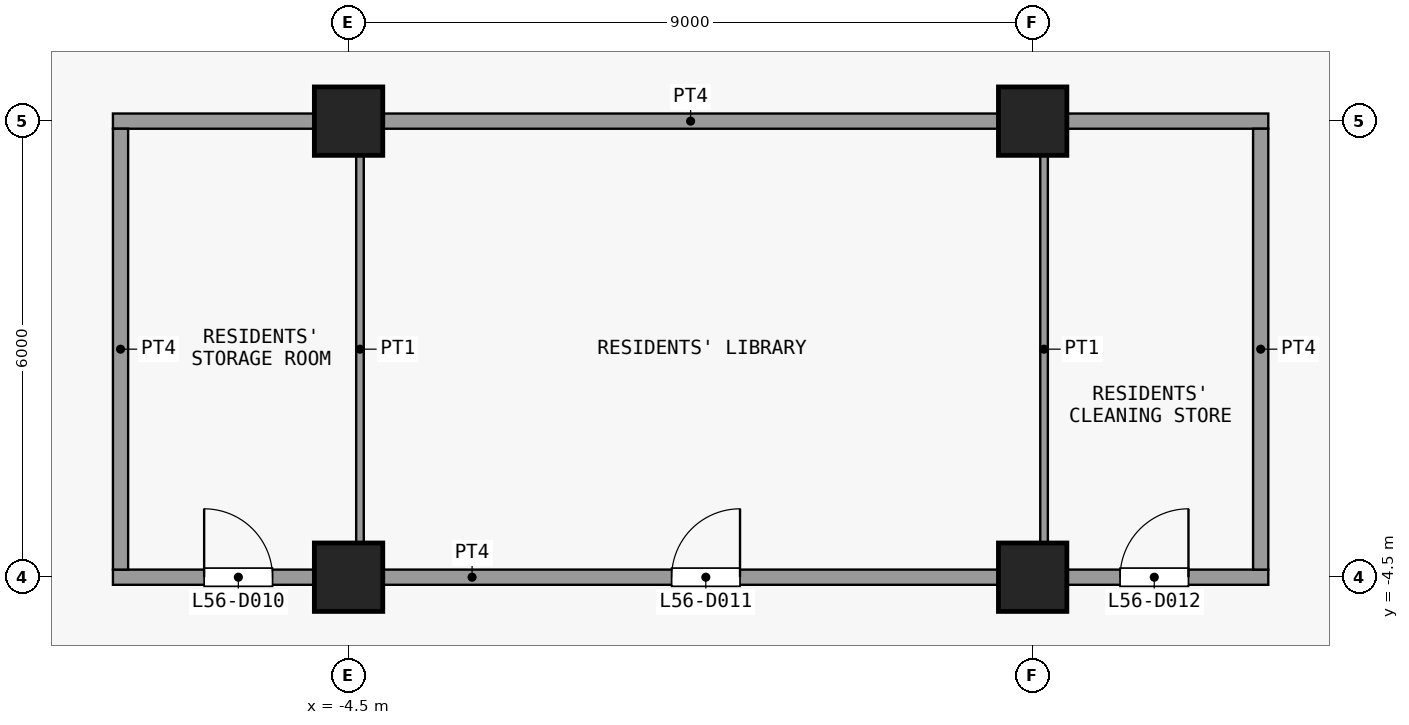
"""IFC4 building model, lengths in metres.
Left out: names, types, materials, properties, quantities, classifications, styles, units other than length and angle.
Written with IfcOpenShell. Run it as: python <this file> out.ifc"""

import sys

from ifc_helpers import new_model, si_unit, direction, frame, frame_2d, origin, origin_2d, place, context, subcontext, project, spatial, rectangle, extrude, element, fill, save


model = new_model("IFC4")
c1 = context("Model", 3, precision=1e-05, world=origin(), true_north=direction((0.0, 1.0)))
c2 = subcontext(c1, "Body", "Model", "MODEL_VIEW")
j1 = project(units=[si_unit("LENGTHUNIT", "METRE"), si_unit("PLANEANGLEUNIT", "RADIAN")], contexts=[c1])
p1 = place(None, origin())
s1 = spatial("IfcSite", under=j1, at=p1, CompositionType="ELEMENT")
p2 = place(p1, origin())
s2 = spatial("IfcBuilding", under=s1, at=p2, CompositionType="ELEMENT")
p3 = place(p2, frame((0.0, 0.0, 223.1)))
s3 = spatial("IfcBuildingStorey", under=s2, at=p3, CompositionType="ELEMENT", Elevation=223.1)
for number, where, z_axis, x_axis in (
    (1, (-4.5, -4.5, 0.0), (0.0, 0.0, 1.0), (1.0, 0.0, 0.0)),
    (2, (-4.5, 1.5, 0.0), (0.0, 0.0, 1.0), (1.0, 0.0, 0.0)),
    (3, (4.5, -4.5, 0.0), (0.0, 0.0, 1.0), (1.0, 0.0, 0.0)),
    (4, (4.5, 1.5, 0.0), (0.0, 0.0, 1.0), (1.0, 0.0, 0.0)),
):
    element("IfcColumn", number, at=place(p3, frame(where, z_axis=z_axis, x_axis=x_axis)), inside=s3, PredefinedType="COLUMN", context=c2, shape_type="SweptSolid", body=[
        extrude(rectangle(XDim=0.9, YDim=0.9, at=origin_2d()), origin(), (0.0, 0.0, 1.0), 3.6),
    ])
p4 = place(p3, frame((-7.6, -4.5, 0.0), z_axis=(0.0, 0.0, 1.0), x_axis=(1.0, 0.0, 0.0)))
e5 = element("IfcWall", 5, at=p4, inside=s3, PredefinedType="PARTITIONING", context=c2, shape_type="SweptSolid", body=[
    extrude(rectangle(XDim=15.2, YDim=0.2, at=frame_2d((7.6, 0.0))), origin(), (0.0, 0.0, 1.0), 3.3),
])
p5 = place(p4, frame((1.2, 0.0, 0.0)))
e6 = element("IfcOpeningElement", 6, at=p5, cuts=e5, PredefinedType="OPENING", context=c2, shape_type="SweptSolid", body=[
    extrude(rectangle(XDim=0.9, YDim=2.1, at=frame_2d((0.45, 1.05))), frame((0.0, 0.11, 0.0), z_axis=(0.0, -1.0, 0.0), x_axis=(1.0, 0.0, 0.0)), (0.0, 0.0, 1.0), 0.22),
])
p6 = place(p4, frame((7.35, 0.0, 0.0)))
e7 = element("IfcOpeningElement", 7, at=p6, cuts=e5, PredefinedType="OPENING", context=c2, shape_type="SweptSolid", body=[
    extrude(rectangle(XDim=0.9, YDim=2.1, at=frame_2d((0.45, 1.05))), frame((0.0, 0.11, 0.0), z_axis=(0.0, -1.0, 0.0), x_axis=(1.0, 0.0, 0.0)), (0.0, 0.0, 1.0), 0.22),
])
p7 = place(p4, frame((13.25, 0.0, 0.0)))
e8 = element("IfcOpeningElement", 8, at=p7, cuts=e5, PredefinedType="OPENING", context=c2, shape_type="SweptSolid", body=[
    extrude(rectangle(XDim=0.9, YDim=2.1, at=frame_2d((0.45, 1.05))), frame((0.0, 0.11, 0.0), z_axis=(0.0, -1.0, 0.0), x_axis=(1.0, 0.0, 0.0)), (0.0, 0.0, 1.0), 0.22),
])
p8 = place(p3, frame((-7.6, 1.5, 0.0), z_axis=(0.0, 0.0, 1.0), x_axis=(1.0, 0.0, 0.0)))
e9 = element("IfcWall", 9, at=p8, inside=s3, PredefinedType="PARTITIONING", context=c2, shape_type="SweptSolid", body=[
    extrude(rectangle(XDim=15.2, YDim=0.2, at=frame_2d((7.6, 0.0))), origin(), (0.0, 0.0, 1.0), 3.3),
])
p9 = place(p3, frame((-7.5, -4.4, 0.0), z_axis=(0.0, 0.0, 1.0), x_axis=(0.0, 1.0, 0.0)))
e10 = element("IfcWall", 10, at=p9, inside=s3, PredefinedType="PARTITIONING", context=c2, shape_type="SweptSolid", body=[
    extrude(rectangle(XDim=5.8, YDim=0.2, at=frame_2d((2.9, 0.0))), origin(), (0.0, 0.0, 1.0), 3.3),
])
for number, where, z_axis, x_axis in (
    (11, (-4.35, -4.4, 0.0), (0.0, 0.0, 1.0), (0.0, 1.0, 0.0)),
    (12, (4.65, -4.4, 0.0), (0.0, 0.0, 1.0), (0.0, 1.0, 0.0)),
):
    element("IfcWall", number, at=place(p3, frame(where, z_axis=z_axis, x_axis=x_axis)), inside=s3, PredefinedType="PARTITIONING", context=c2, shape_type="SweptSolid", body=[
        extrude(rectangle(XDim=5.8, YDim=0.1, at=frame_2d((2.9, 0.0))), origin(), (0.0, 0.0, 1.0), 3.3),
    ])
p10 = place(p3, frame((7.5, -4.4, 0.0), z_axis=(0.0, 0.0, 1.0), x_axis=(0.0, 1.0, 0.0)))
e13 = element("IfcWall", 13, at=p10, inside=s3, PredefinedType="PARTITIONING", context=c2, shape_type="SweptSolid", body=[
    extrude(rectangle(XDim=5.8, YDim=0.2, at=frame_2d((2.9, 0.0))), origin(), (0.0, 0.0, 1.0), 3.3),
])
p11 = place(p5, origin())
e14 = element("IfcDoor", 14, at=p11, inside=s3, OperationType="SINGLE_SWING_RIGHT", PredefinedType="DOOR", context=c2, shape_type="SweptSolid", body=[
    extrude(rectangle(XDim=0.9, YDim=2.1, at=frame_2d((0.45, 1.05))), frame((0.0, 0.025, 0.0), z_axis=(0.0, -1.0, 0.0), x_axis=(1.0, 0.0, 0.0)), (0.0, 0.0, 1.0), 0.05),
])
fill(e6, e14)
p12 = place(p6, origin())
e15 = element("IfcDoor", 15, at=p12, inside=s3, OperationType="SINGLE_SWING_LEFT", PredefinedType="DOOR", context=c2, shape_type="SweptSolid", body=[
    extrude(rectangle(XDim=0.9, YDim=2.1, at=frame_2d((0.45, 1.05))), frame((0.0, 0.025, 0.0), z_axis=(0.0, -1.0, 0.0), x_axis=(1.0, 0.0, 0.0)), (0.0, 0.0, 1.0), 0.05),
])
fill(e7, e15)
p13 = place(p7, origin())
e16 = element("IfcDoor", 16, at=p13, inside=s3, OperationType="SINGLE_SWING_LEFT", PredefinedType="DOOR", context=c2, shape_type="SweptSolid", body=[
    extrude(rectangle(XDim=0.9, YDim=2.1, at=frame_2d((0.45, 1.05))), frame((0.0, 0.025, 0.0), z_axis=(0.0, -1.0, 0.0), x_axis=(1.0, 0.0, 0.0)), (0.0, 0.0, 1.0), 0.05),
])
fill(e8, e16)
save(model, sys.argv[1])
